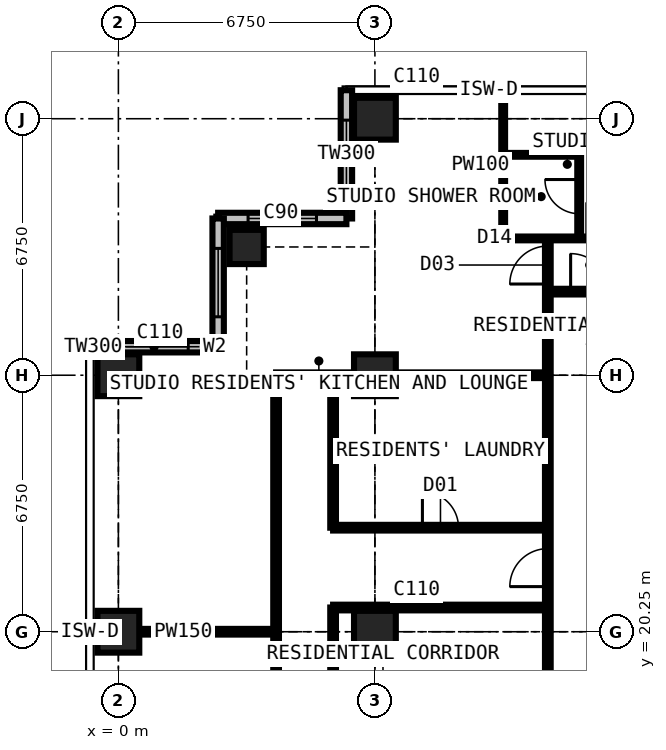
"""IFC4 building model, lengths in metres.
Left out: names, types, materials, properties, quantities, classifications, styles, units other than length and angle.
Written with IfcOpenShell. Run it as: python <this file> out.ifc"""

import sys

from ifc_helpers import new_model, si_unit, direction, frame, frame_2d, origin, origin_2d, place, context, subcontext, project, spatial, rectangle, extrude, element, fill, save


model = new_model("IFC4")
c1 = context("Model", 3, precision=1e-05, world=origin(), true_north=direction((0.0, 1.0)))
c2 = subcontext(c1, "Body", "Model", "MODEL_VIEW")
j1 = project(units=[si_unit("LENGTHUNIT", "METRE"), si_unit("PLANEANGLEUNIT", "RADIAN")], contexts=[c1])
p1 = place(None, origin())
s1 = spatial("IfcSite", under=j1, at=p1, CompositionType="ELEMENT")
p2 = place(p1, origin())
s2 = spatial("IfcBuilding", under=s1, at=p2, CompositionType="ELEMENT")
p3 = place(p2, frame((0.0, 0.0, 211.5)))
s3 = spatial("IfcBuildingStorey", under=s2, at=p3, CompositionType="ELEMENT", Elevation=211.5)
for number, where, z_axis, x_axis in (
    (1, (0.0, 20.25, 0.0), (0.0, 0.0, 1.0), (1.0, 0.0, 0.0)),
    (2, (0.0, 27.0, 0.0), (0.0, 0.0, 1.0), (1.0, 0.0, 0.0)),
):
    element("IfcColumn", number, at=place(p3, frame(where, z_axis=z_axis, x_axis=x_axis)), inside=s3, PredefinedType="COLUMN", context=c2, shape_type="SweptSolid", body=[
        extrude(rectangle(XDim=1.1, YDim=1.1, at=origin_2d()), origin(), (0.0, 0.0, 1.0), 3.6),
    ])
p4 = place(p3, frame((3.375, 30.375, 0.0), z_axis=(0.0, 0.0, 1.0), x_axis=(1.0, 0.0, 0.0)))
e3 = element("IfcColumn", 3, at=p4, inside=s3, PredefinedType="COLUMN", context=c2, shape_type="SweptSolid", body=[
    extrude(rectangle(XDim=0.9, YDim=0.9, at=origin_2d()), origin(), (0.0, 0.0, 1.0), 3.6),
])
for number, where, z_axis, x_axis in (
    (4, (6.75, 20.25, 0.0), (0.0, 0.0, 1.0), (1.0, 0.0, 0.0)),
    (5, (6.75, 27.0, 0.0), (0.0, 0.0, 1.0), (1.0, 0.0, 0.0)),
    (6, (6.75, 33.75, 0.0), (0.0, 0.0, 1.0), (1.0, 0.0, 0.0)),
):
    element("IfcColumn", number, at=place(p3, frame(where, z_axis=z_axis, x_axis=x_axis)), inside=s3, PredefinedType="COLUMN", context=c2, shape_type="SweptSolid", body=[
        extrude(rectangle(XDim=1.1, YDim=1.1, at=origin_2d()), origin(), (0.0, 0.0, 1.0), 3.6),
    ])
p5 = place(p3, frame((6.0, 34.5, 0.0), z_axis=(0.0, 0.0, 1.0), x_axis=(0.0, -1.0, 0.0)))
e7 = element("IfcWall", 7, at=p5, inside=s3, PredefinedType="SOLIDWALL", context=c2, shape_type="SweptSolid", body=[
    extrude(rectangle(XDim=3.375, YDim=0.3, at=frame_2d((1.688, 0.0))), origin(), (0.0, 0.0, 1.0), 3.375),
])
p6 = place(p5, frame((0.788, 0.0, 0.6)))
e8 = element("IfcOpeningElement", 8, at=p6, cuts=e7, PredefinedType="OPENING", context=c2, shape_type="SweptSolid", body=[
    extrude(rectangle(XDim=1.8, YDim=2.1, at=frame_2d((0.9, 1.05))), frame((0.0, 0.16, 0.0), z_axis=(0.0, -1.0, 0.0), x_axis=(1.0, 0.0, 0.0)), (0.0, 0.0, 1.0), 0.32),
])
p7 = place(p3, frame((6.0, 31.125, 0.0), z_axis=(0.0, 0.0, 1.0), x_axis=(-1.0, 0.0, 0.0)))
e9 = element("IfcWall", 9, at=p7, inside=s3, PredefinedType="SOLIDWALL", context=c2, shape_type="SweptSolid", body=[
    extrude(rectangle(XDim=3.375, YDim=0.3, at=frame_2d((1.688, 0.0))), origin(), (0.0, 0.0, 1.0), 3.375),
])
p8 = place(p7, frame((0.788, 0.0, 0.6)))
e10 = element("IfcOpeningElement", 10, at=p8, cuts=e9, PredefinedType="OPENING", context=c2, shape_type="SweptSolid", body=[
    extrude(rectangle(XDim=1.8, YDim=2.1, at=frame_2d((0.9, 1.05))), frame((0.0, 0.16, 0.0), z_axis=(0.0, -1.0, 0.0), x_axis=(1.0, 0.0, 0.0)), (0.0, 0.0, 1.0), 0.32),
])
p9 = place(p3, frame((2.625, 31.125, 0.0), z_axis=(0.0, 0.0, 1.0), x_axis=(0.0, -1.0, 0.0)))
e11 = element("IfcWall", 11, at=p9, inside=s3, PredefinedType="SOLIDWALL", context=c2, shape_type="SweptSolid", body=[
    extrude(rectangle(XDim=3.375, YDim=0.3, at=frame_2d((1.688, 0.0))), origin(), (0.0, 0.0, 1.0), 3.375),
])
p10 = place(p9, frame((0.788, 0.0, 0.6)))
e12 = element("IfcOpeningElement", 12, at=p10, cuts=e11, PredefinedType="OPENING", context=c2, shape_type="SweptSolid", body=[
    extrude(rectangle(XDim=1.8, YDim=2.1, at=frame_2d((0.9, 1.05))), frame((0.0, 0.16, 0.0), z_axis=(0.0, -1.0, 0.0), x_axis=(1.0, 0.0, 0.0)), (0.0, 0.0, 1.0), 0.32),
])
p11 = place(p3, frame((2.625, 27.75, 0.0), z_axis=(0.0, 0.0, 1.0), x_axis=(-1.0, 0.0, 0.0)))
e13 = element("IfcWall", 13, at=p11, inside=s3, PredefinedType="SOLIDWALL", context=c2, shape_type="SweptSolid", body=[
    extrude(rectangle(XDim=3.375, YDim=0.3, at=frame_2d((1.688, 0.0))), origin(), (0.0, 0.0, 1.0), 3.375),
])
p12 = place(p11, frame((0.788, 0.0, 0.6)))
e14 = element("IfcOpeningElement", 14, at=p12, cuts=e13, PredefinedType="OPENING", context=c2, shape_type="SweptSolid", body=[
    extrude(rectangle(XDim=1.8, YDim=2.1, at=frame_2d((0.9, 1.05))), frame((0.0, 0.16, 0.0), z_axis=(0.0, -1.0, 0.0), x_axis=(1.0, 0.0, 0.0)), (0.0, 0.0, 1.0), 0.32),
])
p13 = place(p3, frame((-0.734, 20.25, 0.0), z_axis=(0.0, 0.0, 1.0), x_axis=(1.0, 0.0, 0.0)))
e15 = element("IfcWall", 15, at=p13, inside=s3, PredefinedType="PARTITIONING", context=c2, shape_type="SweptSolid", body=[
    extrude(rectangle(XDim=4.884, YDim=0.15, at=frame_2d((2.442, 0.0))), origin(), (0.0, 0.0, 1.0), 2.877),
])
p14 = place(p3, frame((4.15, 13.5, 0.0), z_axis=(0.0, 0.0, 1.0), x_axis=(0.0, 1.0, 0.0)))
e16 = element("IfcWall", 16, at=p14, inside=s3, PredefinedType="PARTITIONING", context=c2, shape_type="SweptSolid", body=[
    extrude(rectangle(XDim=13.5, YDim=0.15, at=frame_2d((6.75, 0.0))), origin(), (0.0, 0.0, 1.0), 3.375),
])
p15 = place(p14, frame((4.2, 0.0, 0.0)))
e17 = element("IfcOpeningElement", 17, at=p15, cuts=e16, PredefinedType="OPENING", context=c2, shape_type="SweptSolid", body=[
    extrude(rectangle(XDim=0.95, YDim=2.2, at=frame_2d((0.475, 1.1))), frame((0.0, 0.085, 0.0), z_axis=(0.0, -1.0, 0.0), x_axis=(1.0, 0.0, 0.0)), (0.0, 0.0, 1.0), 0.17),
])
p16 = place(p3, frame((4.15, 27.0, 0.0), z_axis=(0.0, 0.0, 1.0), x_axis=(1.0, 0.0, 0.0)))
e18 = element("IfcWall", 18, at=p16, inside=s3, PredefinedType="PARTITIONING", context=c2, shape_type="SweptSolid", body=[
    extrude(rectangle(XDim=7.15, YDim=0.15, at=frame_2d((3.575, 0.0))), origin(), (0.0, 0.0, 1.0), 2.877),
])
p17 = place(p3, frame((5.65, 10.125, 0.0), z_axis=(0.0, 0.0, 1.0), x_axis=(0.0, 1.0, 0.0)))
e19 = element("IfcWall", 19, at=p17, inside=s3, PredefinedType="PARTITIONING", context=c2, shape_type="SweptSolid", body=[
    extrude(rectangle(XDim=10.762, YDim=0.15, at=frame_2d((5.381, 0.0))), origin(), (0.0, 0.0, 1.0), 3.375),
])
p18 = place(p17, frame((4.9, 0.0, 0.0)))
e20 = element("IfcOpeningElement", 20, at=p18, cuts=e19, PredefinedType="OPENING", context=c2, shape_type="SweptSolid", body=[
    extrude(rectangle(XDim=0.95, YDim=2.2, at=frame_2d((0.475, 1.1))), frame((0.0, 0.085, 0.0), z_axis=(0.0, -1.0, 0.0), x_axis=(1.0, 0.0, 0.0)), (0.0, 0.0, 1.0), 0.17),
])
p19 = place(p3, frame((5.65, 20.887, 0.0), z_axis=(0.0, 0.0, 1.0), x_axis=(1.0, 0.0, 0.0)))
e21 = element("IfcWall", 21, at=p19, inside=s3, PredefinedType="PARTITIONING", context=c2, shape_type="SweptSolid", body=[
    extrude(rectangle(XDim=5.65, YDim=0.15, at=frame_2d((2.825, 0.0))), origin(), (0.0, 0.0, 1.0), 3.375),
])
p20 = place(p3, frame((5.65, 22.988, 0.0), z_axis=(0.0, 0.0, 1.0), x_axis=(0.0, 1.0, 0.0)))
e22 = element("IfcWall", 22, at=p20, inside=s3, PredefinedType="PARTITIONING", context=c2, shape_type="SweptSolid", body=[
    extrude(rectangle(XDim=4.012, YDim=0.15, at=frame_2d((2.006, 0.0))), origin(), (0.0, 0.0, 1.0), 3.375),
])
p21 = place(p3, frame((5.65, 22.988, 0.0), z_axis=(0.0, 0.0, 1.0), x_axis=(1.0, 0.0, 0.0)))
e23 = element("IfcWall", 23, at=p21, inside=s3, PredefinedType="PARTITIONING", context=c2, shape_type="SweptSolid", body=[
    extrude(rectangle(XDim=5.65, YDim=0.15, at=frame_2d((2.825, 0.0))), origin(), (0.0, 0.0, 1.0), 3.375),
])
p22 = place(p21, frame((2.35, 0.0, 0.0)))
e24 = element("IfcOpeningElement", 24, at=p22, cuts=e23, PredefinedType="OPENING", context=c2, shape_type="SweptSolid", body=[
    extrude(rectangle(XDim=0.95, YDim=2.2, at=frame_2d((0.475, 1.1))), frame((0.0, 0.085, 0.0), z_axis=(0.0, -1.0, 0.0), x_axis=(1.0, 0.0, 0.0)), (0.0, 0.0, 1.0), 0.17),
])
p23 = place(p3, frame((10.125, 30.6, 0.0), z_axis=(0.0, 0.0, 1.0), x_axis=(0.0, 1.0, 0.0)))
e25 = element("IfcWall", 25, at=p23, inside=s3, PredefinedType="PARTITIONING", context=c2, shape_type="SweptSolid", body=[
    extrude(rectangle(XDim=3.884, YDim=0.1, at=frame_2d((1.942, 0.0))), origin(), (0.0, 0.0, 1.0), 3.375),
])
p24 = place(p3, frame((10.125, 30.6, 0.0), z_axis=(0.0, 0.0, 1.0), x_axis=(1.0, 0.0, 0.0)))
e26 = element("IfcWall", 26, at=p24, inside=s3, PredefinedType="PARTITIONING", context=c2, shape_type="SweptSolid", body=[
    extrude(rectangle(XDim=3.375, YDim=0.1, at=frame_2d((1.688, 0.0))), origin(), (0.0, 0.0, 1.0), 3.375),
])
p25 = place(p24, frame((2.2, 0.0, 0.0)))
e27 = element("IfcOpeningElement", 27, at=p25, cuts=e26, PredefinedType="OPENING", context=c2, shape_type="SweptSolid", body=[
    extrude(rectangle(XDim=0.95, YDim=2.2, at=frame_2d((0.475, 1.1))), frame((0.0, 0.06, 0.0), z_axis=(0.0, -1.0, 0.0), x_axis=(1.0, 0.0, 0.0)), (0.0, 0.0, 1.0), 0.12),
])
p26 = place(p3, frame((10.125, 32.8, 0.0), z_axis=(0.0, 0.0, 1.0), x_axis=(1.0, 0.0, 0.0)))
e28 = element("IfcWall", 28, at=p26, inside=s3, PredefinedType="PARTITIONING", context=c2, shape_type="SweptSolid", body=[
    extrude(rectangle(XDim=2.0, YDim=0.1, at=frame_2d((1.0, 0.0))), origin(), (0.0, 0.0, 1.0), 3.375),
])
p27 = place(p3, frame((11.3, 11.3, 0.0), z_axis=(0.0, 0.0, 1.0), x_axis=(0.0, 1.0, 0.0)))
e29 = element("IfcWall", 29, at=p27, inside=s3, PredefinedType="PARTITIONING", context=c2, shape_type="SweptSolid", body=[
    extrude(rectangle(XDim=19.3, YDim=0.15, at=frame_2d((9.65, 0.0))), origin(), (0.0, 0.0, 1.0), 3.375),
])
p28 = place(p27, frame((18.1, 0.0, 0.0)))
e30 = element("IfcOpeningElement", 30, at=p28, cuts=e29, PredefinedType="OPENING", context=c2, shape_type="SweptSolid", body=[
    extrude(rectangle(XDim=1.0, YDim=2.2, at=frame_2d((0.5, 1.1))), frame((0.0, 0.085, 0.0), z_axis=(0.0, -1.0, 0.0), x_axis=(1.0, 0.0, 0.0)), (0.0, 0.0, 1.0), 0.17),
])
p29 = place(p27, frame((10.137, 0.0, 0.0)))
e31 = element("IfcOpeningElement", 31, at=p29, cuts=e29, PredefinedType="OPENING", context=c2, shape_type="SweptSolid", body=[
    extrude(rectangle(XDim=1.0, YDim=2.2, at=frame_2d((0.5, 1.1))), frame((0.0, 0.085, 0.0), z_axis=(0.0, -1.0, 0.0), x_axis=(1.0, 0.0, 0.0)), (0.0, 0.0, 1.0), 0.17),
])
p30 = place(p3, frame((11.3, 29.2, 0.0), z_axis=(0.0, 0.0, 1.0), x_axis=(1.0, 0.0, 0.0)))
e32 = element("IfcWall", 32, at=p30, inside=s3, PredefinedType="PARTITIONING", context=c2, shape_type="SweptSolid", body=[
    extrude(rectangle(XDim=19.809, YDim=0.15, at=frame_2d((9.904, 0.0))), origin(), (0.0, 0.0, 1.0), 3.375),
])
p31 = place(p30, frame((16.3, 0.0, 0.0)))
e33 = element("IfcOpeningElement", 33, at=p31, cuts=e32, PredefinedType="OPENING", context=c2, shape_type="SweptSolid", body=[
    extrude(rectangle(XDim=1.0, YDim=2.2, at=frame_2d((0.5, 1.1))), frame((0.0, 0.085, 0.0), z_axis=(0.0, -1.0, 0.0), x_axis=(1.0, 0.0, 0.0)), (0.0, 0.0, 1.0), 0.17),
])
p32 = place(p30, frame((5.825, 0.0, 0.0)))
e34 = element("IfcOpeningElement", 34, at=p32, cuts=e32, PredefinedType="OPENING", context=c2, shape_type="SweptSolid", body=[
    extrude(rectangle(XDim=0.95, YDim=2.2, at=frame_2d((0.475, 1.1))), frame((0.0, 0.085, 0.0), z_axis=(0.0, -1.0, 0.0), x_axis=(1.0, 0.0, 0.0)), (0.0, 0.0, 1.0), 0.17),
])
p33 = place(p30, frame((9.2, 0.0, 0.0)))
e35 = element("IfcOpeningElement", 35, at=p33, cuts=e32, PredefinedType="OPENING", context=c2, shape_type="SweptSolid", body=[
    extrude(rectangle(XDim=0.95, YDim=2.2, at=frame_2d((0.475, 1.1))), frame((0.0, 0.085, 0.0), z_axis=(0.0, -1.0, 0.0), x_axis=(1.0, 0.0, 0.0)), (0.0, 0.0, 1.0), 0.17),
])
p34 = place(p30, frame((12.575, 0.0, 0.0)))
e36 = element("IfcOpeningElement", 36, at=p34, cuts=e32, PredefinedType="OPENING", context=c2, shape_type="SweptSolid", body=[
    extrude(rectangle(XDim=0.95, YDim=2.2, at=frame_2d((0.475, 1.1))), frame((0.0, 0.085, 0.0), z_axis=(0.0, -1.0, 0.0), x_axis=(1.0, 0.0, 0.0)), (0.0, 0.0, 1.0), 0.17),
])
p35 = place(p30, frame((0.6, 0.0, 0.0)))
e37 = element("IfcOpeningElement", 37, at=p35, cuts=e32, PredefinedType="OPENING", context=c2, shape_type="SweptSolid", body=[
    extrude(rectangle(XDim=1.0, YDim=2.2, at=frame_2d((0.5, 1.1))), frame((0.0, 0.085, 0.0), z_axis=(0.0, -1.0, 0.0), x_axis=(1.0, 0.0, 0.0)), (0.0, 0.0, 1.0), 0.17),
])
p36 = place(p3, frame((12.125, 30.6, 0.0), z_axis=(0.0, 0.0, 1.0), x_axis=(0.0, 1.0, 0.0)))
e38 = element("IfcWall", 38, at=p36, inside=s3, PredefinedType="PARTITIONING", context=c2, shape_type="SweptSolid", body=[
    extrude(rectangle(XDim=2.2, YDim=0.1, at=frame_2d((1.1, 0.0))), origin(), (0.0, 0.0, 1.0), 3.375),
])
p37 = place(p36, frame((0.65, 0.0, 0.0)))
e39 = element("IfcOpeningElement", 39, at=p37, cuts=e38, PredefinedType="OPENING", context=c2, shape_type="SweptSolid", body=[
    extrude(rectangle(XDim=0.9, YDim=2.2, at=frame_2d((0.45, 1.1))), frame((0.0, 0.06, 0.0), z_axis=(0.0, -1.0, 0.0), x_axis=(1.0, 0.0, 0.0)), (0.0, 0.0, 1.0), 0.12),
])
p38 = place(p6, origin())
e40 = element("IfcWindow", 40, at=p38, inside=s3, PartitioningType="SINGLE_PANEL", PredefinedType="WINDOW", context=c2, shape_type="SweptSolid", body=[
    extrude(rectangle(XDim=1.8, YDim=2.1, at=frame_2d((0.9, 1.05))), frame((0.0, 0.03, 0.0), z_axis=(0.0, -1.0, 0.0), x_axis=(1.0, 0.0, 0.0)), (0.0, 0.0, 1.0), 0.06),
])
fill(e8, e40)
p39 = place(p8, origin())
e41 = element("IfcWindow", 41, at=p39, inside=s3, PartitioningType="SINGLE_PANEL", PredefinedType="WINDOW", context=c2, shape_type="SweptSolid", body=[
    extrude(rectangle(XDim=1.8, YDim=2.1, at=frame_2d((0.9, 1.05))), frame((0.0, 0.03, 0.0), z_axis=(0.0, -1.0, 0.0), x_axis=(1.0, 0.0, 0.0)), (0.0, 0.0, 1.0), 0.06),
])
fill(e10, e41)
p40 = place(p10, origin())
e42 = element("IfcWindow", 42, at=p40, inside=s3, PartitioningType="SINGLE_PANEL", PredefinedType="WINDOW", context=c2, shape_type="SweptSolid", body=[
    extrude(rectangle(XDim=1.8, YDim=2.1, at=frame_2d((0.9, 1.05))), frame((0.0, 0.03, 0.0), z_axis=(0.0, -1.0, 0.0), x_axis=(1.0, 0.0, 0.0)), (0.0, 0.0, 1.0), 0.06),
])
fill(e12, e42)
p41 = place(p12, origin())
e43 = element("IfcWindow", 43, at=p41, inside=s3, PartitioningType="SINGLE_PANEL", PredefinedType="WINDOW", context=c2, shape_type="SweptSolid", body=[
    extrude(rectangle(XDim=1.8, YDim=2.1, at=frame_2d((0.9, 1.05))), frame((0.0, 0.03, 0.0), z_axis=(0.0, -1.0, 0.0), x_axis=(1.0, 0.0, 0.0)), (0.0, 0.0, 1.0), 0.06),
])
fill(e14, e43)
p42 = place(p37, origin())
e44 = element("IfcDoor", 44, at=p42, inside=s3, OperationType="SINGLE_SWING_RIGHT", PredefinedType="DOOR", context=c2, shape_type="SweptSolid", body=[
    extrude(rectangle(XDim=0.9, YDim=2.2, at=frame_2d((0.45, 1.1))), frame((0.0, 0.025, 0.0), z_axis=(0.0, -1.0, 0.0), x_axis=(1.0, 0.0, 0.0)), (0.0, 0.0, 1.0), 0.05),
])
fill(e39, e44)
p43 = place(p35, origin())
e45 = element("IfcDoor", 45, at=p43, inside=s3, OperationType="SINGLE_SWING_LEFT", PredefinedType="DOOR", context=c2, shape_type="SweptSolid", body=[
    extrude(rectangle(XDim=1.0, YDim=2.2, at=frame_2d((0.5, 1.1))), frame((0.0, 0.025, 0.0), z_axis=(0.0, -1.0, 0.0), x_axis=(1.0, 0.0, 0.0)), (0.0, 0.0, 1.0), 0.05),
])
fill(e37, e45)
p44 = place(p28, origin())
e46 = element("IfcDoor", 46, at=p44, inside=s3, OperationType="SINGLE_SWING_LEFT", PredefinedType="DOOR", context=c2, shape_type="SweptSolid", body=[
    extrude(rectangle(XDim=1.0, YDim=2.2, at=frame_2d((0.5, 1.1))), frame((0.0, 0.025, 0.0), z_axis=(0.0, -1.0, 0.0), x_axis=(1.0, 0.0, 0.0)), (0.0, 0.0, 1.0), 0.05),
])
fill(e30, e46)
p45 = place(p29, origin())
e47 = element("IfcDoor", 47, at=p45, inside=s3, OperationType="SINGLE_SWING_LEFT", PredefinedType="DOOR", context=c2, shape_type="SweptSolid", body=[
    extrude(rectangle(XDim=1.0, YDim=2.2, at=frame_2d((0.5, 1.1))), frame((0.0, 0.025, 0.0), z_axis=(0.0, -1.0, 0.0), x_axis=(1.0, 0.0, 0.0)), (0.0, 0.0, 1.0), 0.05),
])
fill(e31, e47)
p46 = place(p22, origin())
e48 = element("IfcDoor", 48, at=p46, inside=s3, OperationType="SINGLE_SWING_LEFT", PredefinedType="DOOR", context=c2, shape_type="SweptSolid", body=[
    extrude(rectangle(XDim=0.95, YDim=2.2, at=frame_2d((0.475, 1.1))), frame((0.0, 0.025, 0.0), z_axis=(0.0, -1.0, 0.0), x_axis=(1.0, 0.0, 0.0)), (0.0, 0.0, 1.0), 0.05),
])
fill(e24, e48)
save(model, sys.argv[1])
